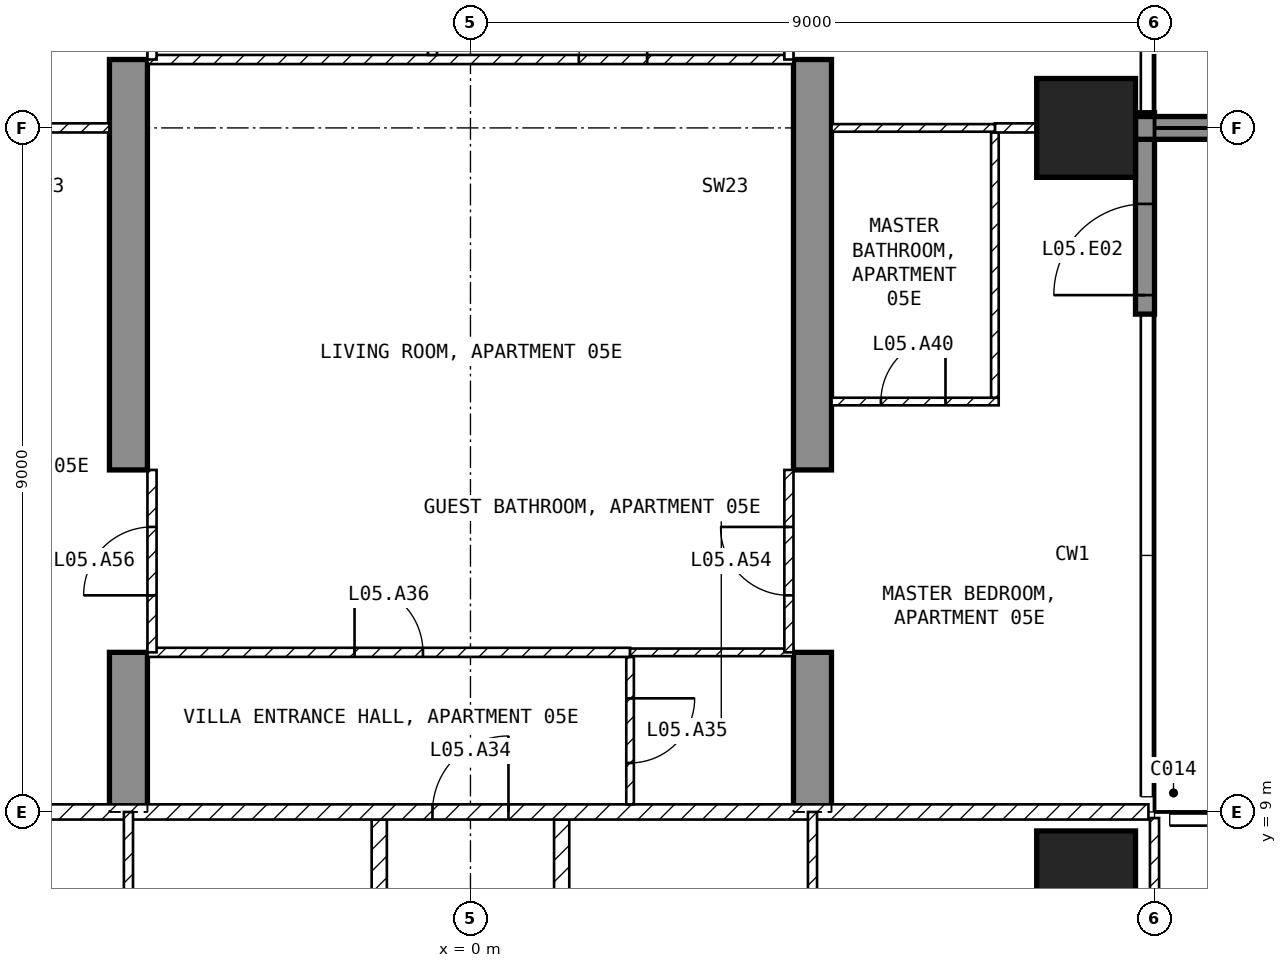
"""IFC4 building model, lengths in metres.
Left out: names, types, materials, properties, quantities, classifications, styles, units other than length and angle.
Written with IfcOpenShell. Run it as: python <this file> out.ifc"""

import sys

from ifc_helpers import new_model, si_unit, direction, frame, frame_2d, origin, origin_2d, place, context, subcontext, project, spatial, polyline, rectangle, outline, extrude, element, fill, save


model = new_model("IFC4")
c1 = context("Model", 3, precision=1e-05, world=origin(), true_north=direction((0.0, 1.0)))
c2 = subcontext(c1, "Body", "Model", "MODEL_VIEW")
j1 = project(units=[si_unit("LENGTHUNIT", "METRE"), si_unit("PLANEANGLEUNIT", "RADIAN")], contexts=[c1])
p1 = place(None, origin())
s1 = spatial("IfcSite", under=j1, at=p1, CompositionType="ELEMENT")
p2 = place(p1, origin())
s2 = spatial("IfcBuilding", under=s1, at=p2, CompositionType="ELEMENT")
p3 = place(p2, frame((0.0, 0.0, 36.5)))
s3 = spatial("IfcBuildingStorey", under=s2, at=p3, CompositionType="ELEMENT", Elevation=36.5)
for number, where, z_axis, x_axis in (
    (1, (8.1, 8.1, -0.25), (0.0, 0.0, 1.0), (1.0, 0.0, 0.0)),
    (2, (8.1, 18.0, -0.25), (0.0, 0.0, 1.0), (1.0, 0.0, 0.0)),
):
    element("IfcColumn", number, at=place(p3, frame(where, z_axis=z_axis, x_axis=x_axis)), inside=s3, PredefinedType="COLUMN", context=c2, shape_type="SweptSolid", body=[
        extrude(rectangle(XDim=1.3, YDim=1.3, at=origin_2d()), origin(), (0.0, 0.0, 1.0), 3.5),
    ])
for number, where, z_axis, x_axis in (
    (3, (-4.75, 9.0, -0.25), (1.0, 0.0, 0.0), (0.0, 1.0, 0.0)),
    (4, (4.25, 9.0, -0.25), (1.0, 0.0, 0.0), (0.0, 1.0, 0.0)),
):
    element("IfcWall", number, at=place(p3, frame(where, z_axis=z_axis, x_axis=x_axis)), inside=s3, PredefinedType="SHEAR", context=c2, shape_type="SweptSolid", body=[
        extrude(outline(polyline([(0.0, 0.0), (2.1, 0.0), (2.1, 2.65), (4.5, 2.65), (4.5, 0.0), (9.9, 0.0), (9.9, 2.65), (12.3, 2.65), (12.3, 0.0), (16.45, 0.0), (16.45, 3.5), (0.0, 3.5), (0.0, 0.0)])), origin(), (0.0, 0.0, 1.0), 0.5),
    ])
p4 = place(p3, frame((8.875, 15.55, 0.0), z_axis=(0.0, 0.0, 1.0), x_axis=(0.0, 1.0, 0.0)))
e5 = element("IfcWall", 5, at=p4, inside=s3, PredefinedType="SOLIDWALL", context=c2, shape_type="SweptSolid", body=[
    extrude(rectangle(XDim=2.65, YDim=0.25, at=frame_2d((1.325, 0.0))), origin(), (0.0, 0.0, 1.0), 3.25),
])
p5 = place(p4, frame((0.25, 0.0, 0.0)))
e6 = element("IfcOpeningElement", 6, at=p5, cuts=e5, PredefinedType="OPENING", context=c2, shape_type="SweptSolid", body=[
    extrude(rectangle(XDim=1.2, YDim=2.4, at=frame_2d((0.6, 1.2))), frame((0.0, 0.135, 0.0), z_axis=(0.0, -1.0, 0.0), x_axis=(1.0, 0.0, 0.0)), (0.0, 0.0, 1.0), 0.27),
])
p6 = place(p3, frame((8.75, 18.0, 0.0), z_axis=(0.0, 0.0, 1.0), x_axis=(1.0, 0.0, 0.0)))
e7 = element("IfcWall", 7, at=p6, inside=s3, PredefinedType="SOLIDWALL", context=c2, shape_type="SweptSolid", body=[
    extrude(rectangle(XDim=2.95, YDim=0.3, at=frame_2d((1.475, 0.0))), origin(), (0.0, 0.0, 1.0), 3.25),
])
for number, where, z_axis, x_axis in (
    (8, (1.2, 8.9, 0.0), (0.0, 0.0, 1.0), (0.0, -1.0, 0.0)),
    (9, (-1.2, 1.3, 0.0), (0.0, 0.0, 1.0), (0.0, 1.0, 0.0)),
):
    element("IfcWall", number, at=place(p3, frame(where, z_axis=z_axis, x_axis=x_axis)), inside=s3, PredefinedType="PARTITIONING", context=c2, shape_type="SweptSolid", body=[
        extrude(rectangle(XDim=7.6, YDim=0.2, at=frame_2d((3.8, 0.0))), origin(), (0.0, 0.0, 1.0), 3.25),
    ])
p7 = place(p3, frame((-8.92, 9.0, 0.0), z_axis=(0.0, 0.0, 1.0), x_axis=(1.0, 0.0, 0.0)))
e10 = element("IfcWall", 10, at=p7, inside=s3, PredefinedType="PARTITIONING", context=c2, shape_type="SweptSolid", body=[
    extrude(rectangle(XDim=17.84, YDim=0.2, at=frame_2d((8.92, 0.0))), origin(), (0.0, 0.0, 1.0), 3.25),
])
p8 = place(p7, frame((8.42, 0.0, 0.0)))
e11 = element("IfcOpeningElement", 11, at=p8, cuts=e10, PredefinedType="OPENING", context=c2, shape_type="SweptSolid", body=[
    extrude(rectangle(XDim=1.0, YDim=2.1, at=frame_2d((0.5, 1.05))), frame((0.0, 0.11, 0.0), z_axis=(0.0, -1.0, 0.0), x_axis=(1.0, 0.0, 0.0)), (0.0, 0.0, 1.0), 0.22),
])
p9 = place(p3, frame((9.0, 1.3, 0.0), z_axis=(0.0, 0.0, 1.0), x_axis=(0.0, 1.0, 0.0)))
e12 = element("IfcWall", 12, at=p9, inside=s3, PredefinedType="PARTITIONING", context=c2, shape_type="SweptSolid", body=[
    extrude(rectangle(XDim=7.62, YDim=0.12, at=frame_2d((3.81, 0.0))), origin(), (0.0, 0.0, 1.0), 3.25),
])
p10 = place(p9, frame((0.4, 0.0, 0.0)))
e13 = element("IfcOpeningElement", 13, at=p10, cuts=e12, PredefinedType="OPENING", context=c2, shape_type="SweptSolid", body=[
    extrude(rectangle(XDim=0.9, YDim=2.1, at=frame_2d((0.45, 1.05))), frame((0.0, 0.07, 0.0), z_axis=(0.0, -1.0, 0.0), x_axis=(1.0, 0.0, 0.0)), (0.0, 0.0, 1.0), 0.14),
])
p11 = place(p3, frame((4.5, 5.1, 0.0), z_axis=(0.0, 0.0, 1.0), x_axis=(0.0, 1.0, 0.0)))
e14 = element("IfcWall", 14, at=p11, inside=s3, PredefinedType="PARTITIONING", context=c2, shape_type="SweptSolid", body=[
    extrude(rectangle(XDim=3.9, YDim=0.12, at=frame_2d((1.95, 0.0))), origin(), (0.0, 0.0, 1.0), 3.25),
])
p12 = place(p11, frame((1.5, 0.0, 0.0)))
e15 = element("IfcOpeningElement", 15, at=p12, cuts=e14, PredefinedType="OPENING", context=c2, shape_type="SweptSolid", body=[
    extrude(rectangle(XDim=0.9, YDim=2.1, at=frame_2d((0.45, 1.05))), frame((0.0, 0.07, 0.0), z_axis=(0.0, -1.0, 0.0), x_axis=(1.0, 0.0, 0.0)), (0.0, 0.0, 1.0), 0.14),
])
p13 = place(p3, frame((-4.5, 9.0, 0.0), z_axis=(0.0, 0.0, 1.0), x_axis=(0.0, -1.0, 0.0)))
e16 = element("IfcWall", 16, at=p13, inside=s3, PredefinedType="PARTITIONING", context=c2, shape_type="SweptSolid", body=[
    extrude(rectangle(XDim=7.7, YDim=0.12, at=frame_2d((3.85, 0.0))), origin(), (0.0, 0.0, 1.0), 3.25),
])
p14 = place(p13, frame((1.812, 0.0, 0.0)))
e17 = element("IfcOpeningElement", 17, at=p14, cuts=e16, PredefinedType="OPENING", context=c2, shape_type="SweptSolid", body=[
    extrude(rectangle(XDim=0.9, YDim=2.1, at=frame_2d((0.45, 1.05))), frame((0.0, 0.07, 0.0), z_axis=(0.0, -1.0, 0.0), x_axis=(1.0, 0.0, 0.0)), (0.0, 0.0, 1.0), 0.14),
])
p15 = place(p3, frame((2.1, 11.04, 0.0), z_axis=(0.0, 0.0, 1.0), x_axis=(0.0, -1.0, 0.0)))
e18 = element("IfcWall", 18, at=p15, inside=s3, PredefinedType="PARTITIONING", context=c2, shape_type="SweptSolid", body=[
    extrude(rectangle(XDim=1.94, YDim=0.1, at=frame_2d((0.97, 0.0))), origin(), (0.0, 0.0, 1.0), 3.25),
])
p16 = place(p15, frame((0.545, 0.0, 0.0)))
e19 = element("IfcOpeningElement", 19, at=p16, cuts=e18, PredefinedType="OPENING", context=c2, shape_type="SweptSolid", body=[
    extrude(rectangle(XDim=0.85, YDim=2.1, at=frame_2d((0.425, 1.05))), frame((0.0, 0.06, 0.0), z_axis=(0.0, -1.0, 0.0), x_axis=(1.0, 0.0, 0.0)), (0.0, 0.0, 1.0), 0.12),
])
p17 = place(p3, frame((-4.25, 11.1, 0.0), z_axis=(0.0, 0.0, 1.0), x_axis=(1.0, 0.0, 0.0)))
e20 = element("IfcWall", 20, at=p17, inside=s3, PredefinedType="PARTITIONING", context=c2, shape_type="SweptSolid", body=[
    extrude(rectangle(XDim=6.35, YDim=0.12, at=frame_2d((3.175, 0.0))), origin(), (0.0, 0.0, 1.0), 3.25),
])
p18 = place(p17, frame((2.725, 0.0, 0.0)))
e21 = element("IfcOpeningElement", 21, at=p18, cuts=e20, PredefinedType="OPENING", context=c2, shape_type="SweptSolid", body=[
    extrude(rectangle(XDim=0.9, YDim=2.1, at=frame_2d((0.45, 1.05))), frame((0.0, 0.07, 0.0), z_axis=(0.0, -1.0, 0.0), x_axis=(1.0, 0.0, 0.0)), (0.0, 0.0, 1.0), 0.14),
])
p19 = place(p3, frame((2.1, 11.1, 0.0), z_axis=(0.0, 0.0, 1.0), x_axis=(1.0, 0.0, 0.0)))
e22 = element("IfcWall", 22, at=p19, inside=s3, PredefinedType="PARTITIONING", context=c2, shape_type="SweptSolid", body=[
    extrude(rectangle(XDim=2.15, YDim=0.1, at=frame_2d((1.075, 0.0))), origin(), (0.0, 0.0, 1.0), 3.25),
])
p20 = place(p3, frame((-4.25, 18.9, 0.0), z_axis=(0.0, 0.0, 1.0), x_axis=(1.0, 0.0, 0.0)))
e23 = element("IfcWall", 23, at=p20, inside=s3, PredefinedType="PARTITIONING", context=c2, shape_type="SweptSolid", body=[
    extrude(rectangle(XDim=8.5, YDim=0.12, at=frame_2d((4.25, 0.0))), origin(), (0.0, 0.0, 1.0), 3.25),
])
p21 = place(p20, frame((5.675, 0.0, 0.0)))
e24 = element("IfcOpeningElement", 24, at=p21, cuts=e23, PredefinedType="OPENING", context=c2, shape_type="SweptSolid", body=[
    extrude(rectangle(XDim=0.9, YDim=2.1, at=frame_2d((0.45, 1.05))), frame((0.0, 0.07, 0.0), z_axis=(0.0, -1.0, 0.0), x_axis=(1.0, 0.0, 0.0)), (0.0, 0.0, 1.0), 0.14),
])
p22 = place(p3, frame((-0.5, 18.96, 0.0), z_axis=(0.0, 0.0, 1.0), x_axis=(0.0, 1.0, 0.0)))
e25 = element("IfcWall", 25, at=p22, inside=s3, PredefinedType="PARTITIONING", context=c2, shape_type="SweptSolid", body=[
    extrude(rectangle(XDim=4.38, YDim=0.12, at=frame_2d((2.19, 0.0))), origin(), (0.0, 0.0, 1.0), 3.25),
])
p23 = place(p22, frame((1.74, 0.0, 0.0)))
e26 = element("IfcOpeningElement", 26, at=p23, cuts=e25, PredefinedType="OPENING", context=c2, shape_type="SweptSolid", body=[
    extrude(rectangle(XDim=0.9, YDim=2.1, at=frame_2d((0.45, 1.05))), frame((0.0, 0.07, 0.0), z_axis=(0.0, -1.0, 0.0), x_axis=(1.0, 0.0, 0.0)), (0.0, 0.0, 1.0), 0.14),
])
p24 = place(p3, frame((4.75, 14.4, 0.0), z_axis=(0.0, 0.0, 1.0), x_axis=(1.0, 0.0, 0.0)))
e27 = element("IfcWall", 27, at=p24, inside=s3, PredefinedType="PARTITIONING", context=c2, shape_type="SweptSolid", body=[
    extrude(rectangle(XDim=2.2, YDim=0.1, at=frame_2d((1.1, 0.0))), origin(), (0.0, 0.0, 1.0), 3.25),
])
p25 = place(p24, frame((0.65, 0.0, 0.0)))
e28 = element("IfcOpeningElement", 28, at=p25, cuts=e27, PredefinedType="OPENING", context=c2, shape_type="SweptSolid", body=[
    extrude(rectangle(XDim=0.85, YDim=2.1, at=frame_2d((0.425, 1.05))), frame((0.0, 0.06, 0.0), z_axis=(0.0, -1.0, 0.0), x_axis=(1.0, 0.0, 0.0)), (0.0, 0.0, 1.0), 0.12),
])
p26 = place(p3, frame((6.9, 14.45, 0.0), z_axis=(0.0, 0.0, 1.0), x_axis=(0.0, 1.0, 0.0)))
e29 = element("IfcWall", 29, at=p26, inside=s3, PredefinedType="PARTITIONING", context=c2, shape_type="SweptSolid", body=[
    extrude(rectangle(XDim=3.49, YDim=0.1, at=frame_2d((1.745, 0.0))), origin(), (0.0, 0.0, 1.0), 3.25),
])
p27 = place(p3, frame((6.9, 18.0, 0.0), z_axis=(0.0, 0.0, 1.0), x_axis=(1.0, 0.0, 0.0)))
e30 = element("IfcWall", 30, at=p27, inside=s3, PredefinedType="PARTITIONING", context=c2, shape_type="SweptSolid", body=[
    extrude(rectangle(XDim=0.55, YDim=0.12, at=frame_2d((0.275, 0.0))), origin(), (0.0, 0.0, 1.0), 2.346),
])
p28 = place(p3, frame((4.75, 18.0, 0.0), z_axis=(0.0, 0.0, 1.0), x_axis=(1.0, 0.0, 0.0)))
e31 = element("IfcWall", 31, at=p28, inside=s3, PredefinedType="PARTITIONING", context=c2, shape_type="SweptSolid", body=[
    extrude(rectangle(XDim=2.15, YDim=0.1, at=frame_2d((1.075, 0.0))), origin(), (0.0, 0.0, 1.0), 2.346),
])
p29 = place(p3, frame((-7.45, 18.0, 0.0), z_axis=(0.0, 0.0, 1.0), x_axis=(1.0, 0.0, 0.0)))
e32 = element("IfcWall", 32, at=p29, inside=s3, PredefinedType="PARTITIONING", context=c2, shape_type="SweptSolid", body=[
    extrude(rectangle(XDim=2.7, YDim=0.12, at=frame_2d((1.35, 0.0))), origin(), (0.0, 0.0, 1.0), 2.346),
])
p30 = place(p3, frame((4.19, 11.1, 0.0), z_axis=(0.0, 0.0, 1.0), x_axis=(0.0, 1.0, 0.0)))
e33 = element("IfcWall", 33, at=p30, inside=s3, PredefinedType="PARTITIONING", context=c2, shape_type="SweptSolid", body=[
    extrude(rectangle(XDim=2.4, YDim=0.12, at=frame_2d((1.2, 0.0))), origin(), (0.0, 0.0, 1.0), 2.4),
])
p31 = place(p30, frame((0.75, 0.0, 0.0)))
e34 = element("IfcOpeningElement", 34, at=p31, cuts=e33, PredefinedType="OPENING", context=c2, shape_type="SweptSolid", body=[
    extrude(rectangle(XDim=0.9, YDim=2.1, at=frame_2d((0.45, 1.05))), frame((0.0, 0.07, 0.0), z_axis=(0.0, -1.0, 0.0), x_axis=(1.0, 0.0, 0.0)), (0.0, 0.0, 1.0), 0.14),
])
p32 = place(p3, frame((4.19, 18.9, 0.0), z_axis=(0.0, 0.0, 1.0), x_axis=(0.0, 1.0, 0.0)))
e35 = element("IfcWall", 35, at=p32, inside=s3, PredefinedType="PARTITIONING", context=c2, shape_type="SweptSolid", body=[
    extrude(rectangle(XDim=2.4, YDim=0.12, at=frame_2d((1.2, 0.0))), origin(), (0.0, 0.0, 1.0), 2.4),
])
p33 = place(p32, frame((0.55, 0.0, 0.0)))
e36 = element("IfcOpeningElement", 36, at=p33, cuts=e35, PredefinedType="OPENING", context=c2, shape_type="SweptSolid", body=[
    extrude(rectangle(XDim=0.9, YDim=2.1, at=frame_2d((0.45, 1.05))), frame((0.0, 0.07, 0.0), z_axis=(0.0, -1.0, 0.0), x_axis=(1.0, 0.0, 0.0)), (0.0, 0.0, 1.0), 0.14),
])
p34 = place(p3, frame((-4.19, 11.1, 0.0), z_axis=(0.0, 0.0, 1.0), x_axis=(0.0, 1.0, 0.0)))
e37 = element("IfcWall", 37, at=p34, inside=s3, PredefinedType="PARTITIONING", context=c2, shape_type="SweptSolid", body=[
    extrude(rectangle(XDim=2.4, YDim=0.12, at=frame_2d((1.2, 0.0))), origin(), (0.0, 0.0, 1.0), 2.4),
])
p35 = place(p34, frame((0.75, 0.0, 0.0)))
e38 = element("IfcOpeningElement", 38, at=p35, cuts=e37, PredefinedType="OPENING", context=c2, shape_type="SweptSolid", body=[
    extrude(rectangle(XDim=0.9, YDim=2.1, at=frame_2d((0.45, 1.05))), frame((0.0, 0.07, 0.0), z_axis=(0.0, -1.0, 0.0), x_axis=(1.0, 0.0, 0.0)), (0.0, 0.0, 1.0), 0.14),
])
p36 = place(p3, frame((-4.19, 18.9, 0.0), z_axis=(0.0, 0.0, 1.0), x_axis=(0.0, 1.0, 0.0)))
e39 = element("IfcWall", 39, at=p36, inside=s3, PredefinedType="PARTITIONING", context=c2, shape_type="SweptSolid", body=[
    extrude(rectangle(XDim=2.4, YDim=0.12, at=frame_2d((1.2, 0.0))), origin(), (0.0, 0.0, 1.0), 2.4),
])
p37 = place(p36, frame((0.75, 0.0, 0.0)))
e40 = element("IfcOpeningElement", 40, at=p37, cuts=e39, PredefinedType="OPENING", context=c2, shape_type="SweptSolid", body=[
    extrude(rectangle(XDim=0.9, YDim=2.1, at=frame_2d((0.45, 1.05))), frame((0.0, 0.07, 0.0), z_axis=(0.0, -1.0, 0.0), x_axis=(1.0, 0.0, 0.0)), (0.0, 0.0, 1.0), 0.14),
])
p38 = place(p5, origin())
e41 = element("IfcDoor", 41, at=p38, inside=s3, OperationType="SINGLE_SWING_LEFT", PredefinedType="DOOR", context=c2, shape_type="SweptSolid", body=[
    extrude(rectangle(XDim=1.2, YDim=2.4, at=frame_2d((0.6, 1.2))), frame((0.0, 0.025, 0.0), z_axis=(0.0, -1.0, 0.0), x_axis=(1.0, 0.0, 0.0)), (0.0, 0.0, 1.0), 0.05),
])
fill(e6, e41)
p39 = place(p8, origin())
e42 = element("IfcDoor", 42, at=p39, inside=s3, OperationType="SINGLE_SWING_RIGHT", PredefinedType="DOOR", context=c2, shape_type="SweptSolid", body=[
    extrude(rectangle(XDim=1.0, YDim=2.1, at=frame_2d((0.5, 1.05))), frame((0.0, 0.025, 0.0), z_axis=(0.0, -1.0, 0.0), x_axis=(1.0, 0.0, 0.0)), (0.0, 0.0, 1.0), 0.05),
])
fill(e11, e42)
p40 = place(p16, origin())
e43 = element("IfcDoor", 43, at=p40, inside=s3, OperationType="SINGLE_SWING_LEFT", PredefinedType="DOOR", context=c2, shape_type="SweptSolid", body=[
    extrude(rectangle(XDim=0.85, YDim=2.1, at=frame_2d((0.425, 1.05))), frame((0.0, 0.025, 0.0), z_axis=(0.0, -1.0, 0.0), x_axis=(1.0, 0.0, 0.0)), (0.0, 0.0, 1.0), 0.05),
])
fill(e19, e43)
p41 = place(p18, origin())
e44 = element("IfcDoor", 44, at=p41, inside=s3, OperationType="SINGLE_SWING_LEFT", PredefinedType="DOOR", context=c2, shape_type="SweptSolid", body=[
    extrude(rectangle(XDim=0.9, YDim=2.1, at=frame_2d((0.45, 1.05))), frame((0.0, 0.025, 0.0), z_axis=(0.0, -1.0, 0.0), x_axis=(1.0, 0.0, 0.0)), (0.0, 0.0, 1.0), 0.05),
])
fill(e21, e44)
p42 = place(p21, origin())
e45 = element("IfcDoor", 45, at=p42, inside=s3, OperationType="SINGLE_SWING_RIGHT", PredefinedType="DOOR", context=c2, shape_type="SweptSolid", body=[
    extrude(rectangle(XDim=0.9, YDim=2.1, at=frame_2d((0.45, 1.05))), frame((0.0, 0.025, 0.0), z_axis=(0.0, -1.0, 0.0), x_axis=(1.0, 0.0, 0.0)), (0.0, 0.0, 1.0), 0.05),
])
fill(e24, e45)
p43 = place(p25, origin())
e46 = element("IfcDoor", 46, at=p43, inside=s3, OperationType="SINGLE_SWING_RIGHT", PredefinedType="DOOR", context=c2, shape_type="SweptSolid", body=[
    extrude(rectangle(XDim=0.85, YDim=2.1, at=frame_2d((0.425, 1.05))), frame((0.0, 0.025, 0.0), z_axis=(0.0, -1.0, 0.0), x_axis=(1.0, 0.0, 0.0)), (0.0, 0.0, 1.0), 0.05),
])
fill(e28, e46)
p44 = place(p31, origin())
e47 = element("IfcDoor", 47, at=p44, inside=s3, OperationType="SINGLE_SWING_RIGHT", PredefinedType="DOOR", context=c2, shape_type="SweptSolid", body=[
    extrude(rectangle(XDim=0.9, YDim=2.1, at=frame_2d((0.45, 1.05))), frame((0.0, 0.025, 0.0), z_axis=(0.0, -1.0, 0.0), x_axis=(1.0, 0.0, 0.0)), (0.0, 0.0, 1.0), 0.05),
])
fill(e34, e47)
p45 = place(p35, origin())
e48 = element("IfcDoor", 48, at=p45, inside=s3, OperationType="SINGLE_SWING_LEFT", PredefinedType="DOOR", context=c2, shape_type="SweptSolid", body=[
    extrude(rectangle(XDim=0.9, YDim=2.1, at=frame_2d((0.45, 1.05))), frame((0.0, 0.025, 0.0), z_axis=(0.0, -1.0, 0.0), x_axis=(1.0, 0.0, 0.0)), (0.0, 0.0, 1.0), 0.05),
])
fill(e38, e48)
save(model, sys.argv[1])
